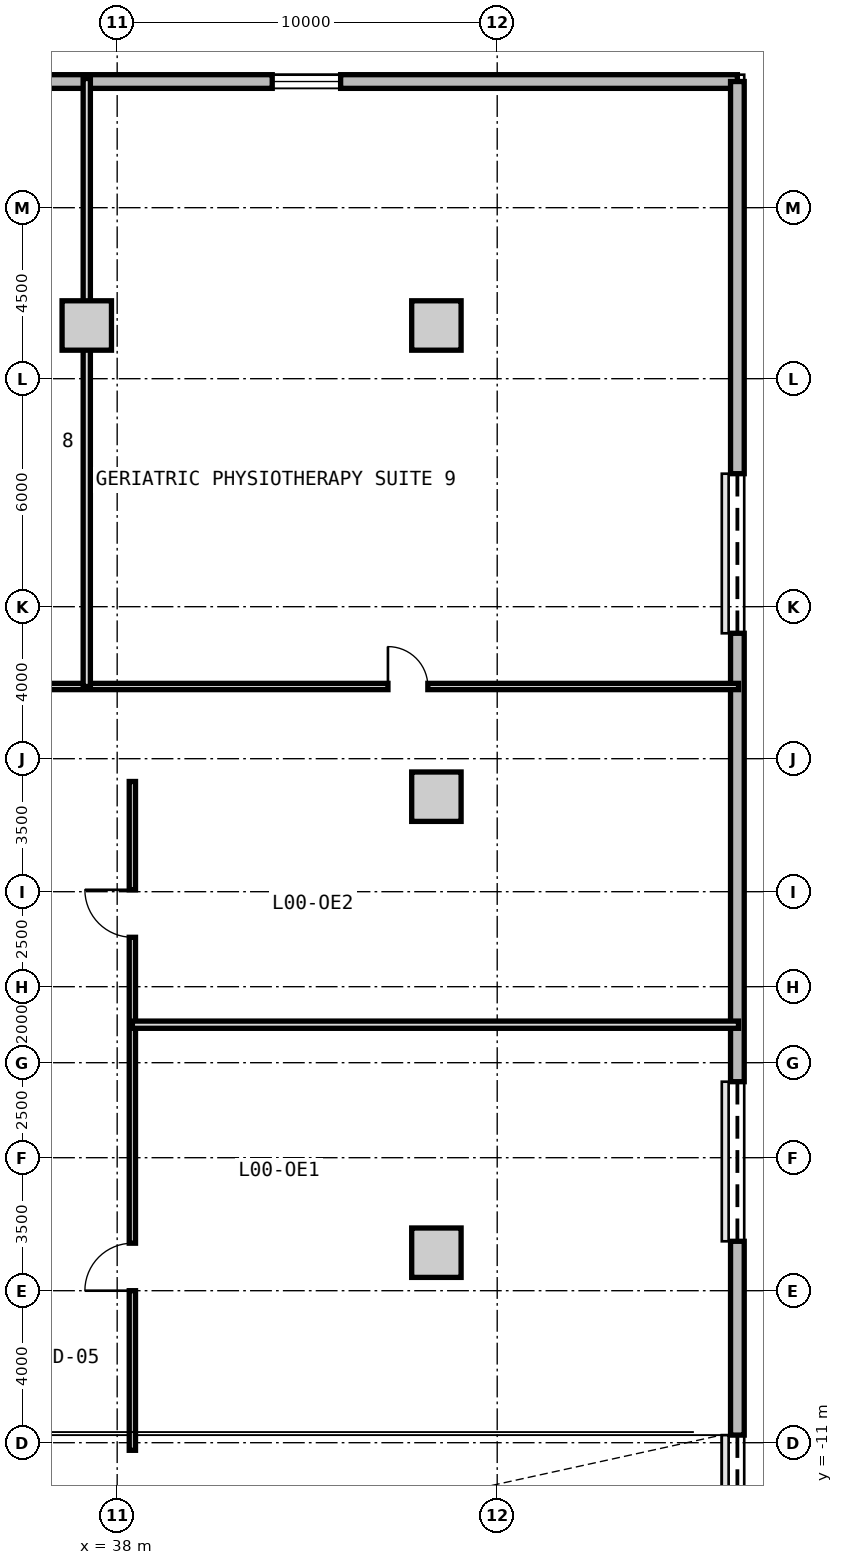
"""IFC4 building model, lengths in metres.
Left out: names, types, materials, properties, quantities, classifications, styles, units other than length and angle.
Written with IfcOpenShell. Run it as: python <this file> out.ifc"""

import sys

from ifc_helpers import new_model, si_unit, direction, frame, frame_2d, origin, origin_2d, place, context, subcontext, project, spatial, rectangle, extrude, source, transform, mapped, element, fill, save


model = new_model("IFC4")
c1 = context("Model", 3, precision=1e-05, world=origin(), true_north=direction((0.0, 1.0)))
c2 = subcontext(c1, "Body", "Model", "MODEL_VIEW")
j1 = project(units=[si_unit("LENGTHUNIT", "METRE"), si_unit("PLANEANGLEUNIT", "RADIAN")], contexts=[c1])
p1 = place(None, origin())
s1 = spatial("IfcSite", under=j1, at=p1, CompositionType="ELEMENT")
p2 = place(p1, origin())
s2 = spatial("IfcBuilding", under=s1, at=p2, CompositionType="ELEMENT")
p3 = place(p2, origin())
s3 = spatial("IfcBuildingStorey", under=s2, at=p3, CompositionType="ELEMENT", Elevation=0.0)
m1 = source(origin(), c2, "Body", "SweptSolid", [
    extrude(rectangle(XDim=1.3, YDim=1.3, at=origin_2d()), origin(), (0.0, 0.0, 1.0), 4.2),
])
for number, where, z_axis, x_axis in (
    (1, (37.2, 18.4, 0.0), (0.0, 0.0, 1.0), (1.0, 0.0, 0.0)),
    (2, (46.4, 18.4, 0.0), (0.0, 0.0, 1.0), (1.0, 0.0, 0.0)),
    (3, (46.4, -6.0, 0.0), (0.0, 0.0, 1.0), (1.0, 0.0, 0.0)),
    (4, (46.4, 6.0, 0.0), (0.0, 0.0, 1.0), (1.0, 0.0, 0.0)),
):
    element("IfcColumn", number, at=place(p3, frame(where, z_axis=z_axis, x_axis=x_axis)), inside=s3, PredefinedType="COLUMN", context=c2, shape_type="MappedRepresentation", body=[
        mapped(m1, transform((0.0, 0.0, 0.0), x_axis=(1.0, 0.0, 0.0), y_axis=(0.0, 1.0, 0.0), z_axis=(0.0, 0.0, 1.0), scale=1.0)),
    ])
m2 = source(origin(), c2, "Body", "SweptSolid", [
    extrude(rectangle(XDim=108.64, YDim=0.36, at=frame_2d((54.32, 0.0))), origin(), (0.0, 0.0, 1.0), 3.88),
])
p4 = place(p3, frame((-54.32, 24.82, 0.0), z_axis=(0.0, 0.0, 1.0), x_axis=(1.0, 0.0, 0.0)))
e5 = element("IfcWall", 5, at=p4, inside=s3, PredefinedType="SOLIDWALL", context=c2, shape_type="MappedRepresentation", body=[
    mapped(m2, transform((0.0, 0.0, 0.0), x_axis=(1.0, 0.0, 0.0), y_axis=(0.0, 1.0, 0.0), z_axis=(0.0, 0.0, 1.0), scale=1.0)),
])
p5 = place(p4, frame((30.82, 0.0, 0.0)))
e6 = element("IfcOpeningElement", 6, at=p5, cuts=e5, PredefinedType="OPENING", context=c2, shape_type="SweptSolid", body=[
    extrude(rectangle(XDim=2.0, YDim=2.3, at=frame_2d((1.0, 1.15))), frame((0.0, 0.19, 0.0), z_axis=(0.0, -1.0, 0.0), x_axis=(1.0, 0.0, 0.0)), (0.0, 0.0, 1.0), 0.38),
])
p6 = place(p4, frame((75.82, 0.0, 0.0)))
e7 = element("IfcOpeningElement", 7, at=p6, cuts=e5, PredefinedType="OPENING", context=c2, shape_type="SweptSolid", body=[
    extrude(rectangle(XDim=2.0, YDim=2.3, at=frame_2d((1.0, 1.15))), frame((0.0, 0.19, 0.0), z_axis=(0.0, -1.0, 0.0), x_axis=(1.0, 0.0, 0.0)), (0.0, 0.0, 1.0), 0.38),
])
p7 = place(p4, frame((4.0, 0.0, 0.85)))
e8 = element("IfcOpeningElement", 8, at=p7, cuts=e5, PredefinedType="OPENING", context=c2, shape_type="SweptSolid", body=[
    extrude(rectangle(XDim=2.4, YDim=2.2, at=frame_2d((1.2, 1.1))), frame((0.0, 0.19, 0.0), z_axis=(0.0, -1.0, 0.0), x_axis=(1.0, 0.0, 0.0)), (0.0, 0.0, 1.0), 0.38),
])
p8 = place(p4, frame((12.4, 0.0, 0.85)))
e9 = element("IfcOpeningElement", 9, at=p8, cuts=e5, PredefinedType="OPENING", context=c2, shape_type="SweptSolid", body=[
    extrude(rectangle(XDim=3.0, YDim=2.1, at=frame_2d((1.5, 1.05))), frame((0.0, 0.19, 0.0), z_axis=(0.0, -1.0, 0.0), x_axis=(1.0, 0.0, 0.0)), (0.0, 0.0, 1.0), 0.38),
])
p9 = place(p4, frame((20.8, 0.0, 0.9)))
e10 = element("IfcOpeningElement", 10, at=p9, cuts=e5, PredefinedType="OPENING", context=c2, shape_type="SweptSolid", body=[
    extrude(rectangle(XDim=1.8, YDim=2.0, at=frame_2d((0.9, 1.0))), frame((0.0, 0.19, 0.0), z_axis=(0.0, -1.0, 0.0), x_axis=(1.0, 0.0, 0.0)), (0.0, 0.0, 1.0), 0.38),
])
p10 = place(p4, frame((54.4, 0.0, 0.85)))
e11 = element("IfcOpeningElement", 11, at=p10, cuts=e5, PredefinedType="OPENING", context=c2, shape_type="SweptSolid", body=[
    extrude(rectangle(XDim=2.4, YDim=2.2, at=frame_2d((1.2, 1.1))), frame((0.0, 0.19, 0.0), z_axis=(0.0, -1.0, 0.0), x_axis=(1.0, 0.0, 0.0)), (0.0, 0.0, 1.0), 0.38),
])
p11 = place(p4, frame((62.8, 0.0, 0.85)))
e12 = element("IfcOpeningElement", 12, at=p11, cuts=e5, PredefinedType="OPENING", context=c2, shape_type="SweptSolid", body=[
    extrude(rectangle(XDim=3.0, YDim=2.1, at=frame_2d((1.5, 1.05))), frame((0.0, 0.19, 0.0), z_axis=(0.0, -1.0, 0.0), x_axis=(1.0, 0.0, 0.0)), (0.0, 0.0, 1.0), 0.38),
])
p12 = place(p4, frame((96.4, 0.0, 0.9)))
e13 = element("IfcOpeningElement", 13, at=p12, cuts=e5, PredefinedType="OPENING", context=c2, shape_type="SweptSolid", body=[
    extrude(rectangle(XDim=1.8, YDim=2.0, at=frame_2d((0.9, 1.0))), frame((0.0, 0.19, 0.0), z_axis=(0.0, -1.0, 0.0), x_axis=(1.0, 0.0, 0.0)), (0.0, 0.0, 1.0), 0.38),
])
m3 = source(origin(), c2, "Body", "SweptSolid", [
    extrude(rectangle(XDim=49.64, YDim=0.36, at=frame_2d((24.82, 0.0))), origin(), (0.0, 0.0, 1.0), 3.88),
])
p13 = place(p3, frame((54.32, 24.82, 0.0), z_axis=(0.0, 0.0, 1.0), x_axis=(0.0, -1.0, 0.0)))
e14 = element("IfcWall", 14, at=p13, inside=s3, PredefinedType="SOLIDWALL", context=c2, shape_type="MappedRepresentation", body=[
    mapped(m3, transform((0.0, 0.0, 0.0), x_axis=(1.0, 0.0, 0.0), y_axis=(0.0, 1.0, 0.0), z_axis=(0.0, 0.0, 1.0), scale=1.0)),
])
p14 = place(p13, frame((35.62, 0.0, 0.0)))
e15 = element("IfcOpeningElement", 15, at=p14, cuts=e14, PredefinedType="OPENING", context=c2, shape_type="SweptSolid", body=[
    extrude(rectangle(XDim=6.6, YDim=2.8, at=frame_2d((3.3, 1.4))), frame((0.0, 0.19, 0.0), z_axis=(0.0, -1.0, 0.0), x_axis=(1.0, 0.0, 0.0)), (0.0, 0.0, 1.0), 0.38),
])
p15 = place(p13, frame((10.32, 0.0, 0.0)))
e16 = element("IfcOpeningElement", 16, at=p15, cuts=e14, PredefinedType="OPENING", context=c2, shape_type="SweptSolid", body=[
    extrude(rectangle(XDim=4.2, YDim=2.7, at=frame_2d((2.1, 1.35))), frame((0.0, 0.19, 0.0), z_axis=(0.0, -1.0, 0.0), x_axis=(1.0, 0.0, 0.0)), (0.0, 0.0, 1.0), 0.38),
])
p16 = place(p13, frame((26.32, 0.0, 0.0)))
e17 = element("IfcOpeningElement", 17, at=p16, cuts=e14, PredefinedType="OPENING", context=c2, shape_type="SweptSolid", body=[
    extrude(rectangle(XDim=4.2, YDim=2.7, at=frame_2d((2.1, 1.35))), frame((0.0, 0.19, 0.0), z_axis=(0.0, -1.0, 0.0), x_axis=(1.0, 0.0, 0.0)), (0.0, 0.0, 1.0), 0.38),
])
m4 = source(origin(), c2, "Body", "SweptSolid", [
    extrude(rectangle(XDim=17.6, YDim=0.165, at=frame_2d((8.8, 0.0))), origin(), (0.0, 0.0, 1.0), 3.865),
])
p17 = place(p3, frame((38.4, -11.2, 0.0), z_axis=(0.0, 0.0, 1.0), x_axis=(0.0, 1.0, 0.0)))
e18 = element("IfcWall", 18, at=p17, inside=s3, PredefinedType="PARTITIONING", context=c2, shape_type="MappedRepresentation", body=[
    mapped(m4, transform((0.0, 0.0, 0.0), x_axis=(1.0, 0.0, 0.0), y_axis=(0.0, 1.0, 0.0), z_axis=(0.0, 0.0, 1.0), scale=1.0)),
])
p18 = place(p17, frame((4.2, 0.0, 0.0)))
e19 = element("IfcOpeningElement", 19, at=p18, cuts=e18, PredefinedType="OPENING", context=c2, shape_type="SweptSolid", body=[
    extrude(rectangle(XDim=1.25, YDim=2.2, at=frame_2d((0.625, 1.1))), frame((0.0, 0.093, 0.0), z_axis=(0.0, -1.0, 0.0), x_axis=(1.0, 0.0, 0.0)), (0.0, 0.0, 1.0), 0.185),
])
p19 = place(p17, frame((13.5, 0.0, 0.0)))
e20 = element("IfcOpeningElement", 20, at=p19, cuts=e18, PredefinedType="OPENING", context=c2, shape_type="SweptSolid", body=[
    extrude(rectangle(XDim=1.25, YDim=2.2, at=frame_2d((0.625, 1.1))), frame((0.0, 0.093, 0.0), z_axis=(0.0, -1.0, 0.0), x_axis=(1.0, 0.0, 0.0)), (0.0, 0.0, 1.0), 0.185),
])
m5 = source(origin(), c2, "Body", "SweptSolid", [
    extrude(rectangle(XDim=15.95, YDim=0.19, at=frame_2d((7.975, 0.0))), origin(), (0.0, 0.0, 1.0), 3.865),
])
p20 = place(p3, frame((38.4, 0.0, 0.0), z_axis=(0.0, 0.0, 1.0), x_axis=(1.0, 0.0, 0.0)))
e21 = element("IfcWall", 21, at=p20, inside=s3, PredefinedType="PARTITIONING", context=c2, shape_type="MappedRepresentation", body=[
    mapped(m5, transform((0.0, 0.0, 0.0), x_axis=(1.0, 0.0, 0.0), y_axis=(0.0, 1.0, 0.0), z_axis=(0.0, 0.0, 1.0), scale=1.0)),
])
m6 = source(origin(), c2, "Body", "SweptSolid", [
    extrude(rectangle(XDim=108.7, YDim=0.165, at=frame_2d((54.35, 0.0))), origin(), (0.0, 0.0, 1.0), 3.865),
])
p21 = place(p3, frame((-54.35, 8.9, 0.0), z_axis=(0.0, 0.0, 1.0), x_axis=(1.0, 0.0, 0.0)))
e22 = element("IfcWall", 22, at=p21, inside=s3, PredefinedType="PARTITIONING", context=c2, shape_type="MappedRepresentation", body=[
    mapped(m6, transform((0.0, 0.0, 0.0), x_axis=(1.0, 0.0, 0.0), y_axis=(0.0, 1.0, 0.0), z_axis=(0.0, 0.0, 1.0), scale=1.0)),
])
p22 = place(p21, frame((8.175, 0.0, 0.0)))
e23 = element("IfcOpeningElement", 23, at=p22, cuts=e22, PredefinedType="OPENING", context=c2, shape_type="SweptSolid", body=[
    extrude(rectangle(XDim=1.05, YDim=2.15, at=frame_2d((0.525, 1.075))), frame((0.0, 0.093, 0.0), z_axis=(0.0, -1.0, 0.0), x_axis=(1.0, 0.0, 0.0)), (0.0, 0.0, 1.0), 0.185),
])
p23 = place(p21, frame((21.225, 0.0, 0.0)))
e24 = element("IfcOpeningElement", 24, at=p23, cuts=e22, PredefinedType="OPENING", context=c2, shape_type="SweptSolid", body=[
    extrude(rectangle(XDim=1.05, YDim=2.15, at=frame_2d((0.525, 1.075))), frame((0.0, 0.093, 0.0), z_axis=(0.0, -1.0, 0.0), x_axis=(1.0, 0.0, 0.0)), (0.0, 0.0, 1.0), 0.185),
])
p24 = place(p21, frame((31.4, 0.0, 0.0)))
e25 = element("IfcOpeningElement", 25, at=p24, cuts=e22, PredefinedType="OPENING", context=c2, shape_type="SweptSolid", body=[
    extrude(rectangle(XDim=1.1, YDim=2.15, at=frame_2d((0.55, 1.075))), frame((0.0, 0.093, 0.0), z_axis=(0.0, -1.0, 0.0), x_axis=(1.0, 0.0, 0.0)), (0.0, 0.0, 1.0), 0.185),
])
p25 = place(p21, frame((42.175, 0.0, 0.0)))
e26 = element("IfcOpeningElement", 26, at=p25, cuts=e22, PredefinedType="OPENING", context=c2, shape_type="SweptSolid", body=[
    extrude(rectangle(XDim=1.05, YDim=2.15, at=frame_2d((0.525, 1.075))), frame((0.0, 0.093, 0.0), z_axis=(0.0, -1.0, 0.0), x_axis=(1.0, 0.0, 0.0)), (0.0, 0.0, 1.0), 0.185),
])
p26 = place(p21, frame((53.825, 0.0, 0.0)))
e27 = element("IfcOpeningElement", 27, at=p26, cuts=e22, PredefinedType="OPENING", context=c2, shape_type="SweptSolid", body=[
    extrude(rectangle(XDim=1.05, YDim=2.15, at=frame_2d((0.525, 1.075))), frame((0.0, 0.093, 0.0), z_axis=(0.0, -1.0, 0.0), x_axis=(1.0, 0.0, 0.0)), (0.0, 0.0, 1.0), 0.185),
])
p27 = place(p21, frame((65.475, 0.0, 0.0)))
e28 = element("IfcOpeningElement", 28, at=p27, cuts=e22, PredefinedType="OPENING", context=c2, shape_type="SweptSolid", body=[
    extrude(rectangle(XDim=1.05, YDim=2.15, at=frame_2d((0.525, 1.075))), frame((0.0, 0.093, 0.0), z_axis=(0.0, -1.0, 0.0), x_axis=(1.0, 0.0, 0.0)), (0.0, 0.0, 1.0), 0.185),
])
p28 = place(p21, frame((76.2, 0.0, 0.0)))
e29 = element("IfcOpeningElement", 29, at=p28, cuts=e22, PredefinedType="OPENING", context=c2, shape_type="SweptSolid", body=[
    extrude(rectangle(XDim=1.1, YDim=2.15, at=frame_2d((0.55, 1.075))), frame((0.0, 0.093, 0.0), z_axis=(0.0, -1.0, 0.0), x_axis=(1.0, 0.0, 0.0)), (0.0, 0.0, 1.0), 0.185),
])
p29 = place(p21, frame((86.425, 0.0, 0.0)))
e30 = element("IfcOpeningElement", 30, at=p29, cuts=e22, PredefinedType="OPENING", context=c2, shape_type="SweptSolid", body=[
    extrude(rectangle(XDim=1.05, YDim=2.15, at=frame_2d((0.525, 1.075))), frame((0.0, 0.093, 0.0), z_axis=(0.0, -1.0, 0.0), x_axis=(1.0, 0.0, 0.0)), (0.0, 0.0, 1.0), 0.185),
])
p30 = place(p21, frame((99.475, 0.0, 0.0)))
e31 = element("IfcOpeningElement", 31, at=p30, cuts=e22, PredefinedType="OPENING", context=c2, shape_type="SweptSolid", body=[
    extrude(rectangle(XDim=1.05, YDim=2.15, at=frame_2d((0.525, 1.075))), frame((0.0, 0.093, 0.0), z_axis=(0.0, -1.0, 0.0), x_axis=(1.0, 0.0, 0.0)), (0.0, 0.0, 1.0), 0.185),
])
m7 = source(origin(), c2, "Body", "SweptSolid", [
    extrude(rectangle(XDim=16.0, YDim=0.19, at=frame_2d((8.0, 0.0))), origin(), (0.0, 0.0, 1.0), 3.865),
])
p31 = place(p3, frame((37.2, 8.9, 0.0), z_axis=(0.0, 0.0, 1.0), x_axis=(0.0, 1.0, 0.0)))
e32 = element("IfcWall", 32, at=p31, inside=s3, PredefinedType="PARTITIONING", context=c2, shape_type="MappedRepresentation", body=[
    mapped(m7, transform((0.0, 0.0, 0.0), x_axis=(1.0, 0.0, 0.0), y_axis=(0.0, 1.0, 0.0), z_axis=(0.0, 0.0, 1.0), scale=1.0)),
])
m8 = source(origin(), c2, "Body", "SweptSolid", [
    extrude(rectangle(XDim=6.6, YDim=2.8, at=frame_2d((3.3, 1.4))), frame((0.0, 0.025, 0.0), z_axis=(0.0, -1.0, 0.0), x_axis=(1.0, 0.0, 0.0)), (0.0, 0.0, 1.0), 0.05),
])
p32 = place(p14, origin())
e33 = element("IfcDoor", 33, at=p32, inside=s3, OperationType="ROLLINGUP", PredefinedType="GATE", context=c2, shape_type="MappedRepresentation", body=[
    mapped(m8, transform((0.0, 0.0, 0.0), x_axis=(1.0, 0.0, 0.0), y_axis=(0.0, 1.0, 0.0), z_axis=(0.0, 0.0, 1.0), scale=1.0)),
])
fill(e15, e33)
m9 = source(origin(), c2, "Body", "SweptSolid", [
    extrude(rectangle(XDim=4.2, YDim=2.7, at=frame_2d((2.1, 1.35))), frame((0.0, 0.025, 0.0), z_axis=(0.0, -1.0, 0.0), x_axis=(1.0, 0.0, 0.0)), (0.0, 0.0, 1.0), 0.05),
])
p33 = place(p15, origin())
e34 = element("IfcDoor", 34, at=p33, inside=s3, OperationType="ROLLINGUP", PredefinedType="GATE", context=c2, shape_type="MappedRepresentation", body=[
    mapped(m9, transform((0.0, 0.0, 0.0), x_axis=(1.0, 0.0, 0.0), y_axis=(0.0, 1.0, 0.0), z_axis=(0.0, 0.0, 1.0), scale=1.0)),
])
fill(e16, e34)
p34 = place(p16, origin())
e35 = element("IfcDoor", 35, at=p34, inside=s3, OperationType="ROLLINGUP", PredefinedType="GATE", context=c2, shape_type="MappedRepresentation", body=[
    mapped(m9, transform((0.0, 0.0, 0.0), x_axis=(1.0, 0.0, 0.0), y_axis=(0.0, 1.0, 0.0), z_axis=(0.0, 0.0, 1.0), scale=1.0)),
])
fill(e17, e35)
m10 = source(origin(), c2, "Body", "SweptSolid", [
    extrude(rectangle(XDim=1.8, YDim=2.0, at=frame_2d((0.9, 1.0))), frame((0.0, 0.03, 0.0), z_axis=(0.0, -1.0, 0.0), x_axis=(1.0, 0.0, 0.0)), (0.0, 0.0, 1.0), 0.06),
])
p35 = place(p12, origin())
e36 = element("IfcWindow", 36, at=p35, inside=s3, PartitioningType="SINGLE_PANEL", PredefinedType="WINDOW", context=c2, shape_type="MappedRepresentation", body=[
    mapped(m10, transform((0.0, 0.0, 0.0), x_axis=(1.0, 0.0, 0.0), y_axis=(0.0, 1.0, 0.0), z_axis=(0.0, 0.0, 1.0), scale=1.0)),
])
fill(e13, e36)
m11 = source(origin(), c2, "Body", "SweptSolid", [
    extrude(rectangle(XDim=1.25, YDim=2.2, at=frame_2d((0.625, 1.1))), frame((0.0, 0.025, 0.0), z_axis=(0.0, -1.0, 0.0), x_axis=(1.0, 0.0, 0.0)), (0.0, 0.0, 1.0), 0.05),
])
p36 = place(p18, origin())
e37 = element("IfcDoor", 37, at=p36, inside=s3, OperationType="SINGLE_SWING_LEFT", PredefinedType="DOOR", context=c2, shape_type="MappedRepresentation", body=[
    mapped(m11, transform((0.0, 0.0, 0.0), x_axis=(1.0, 0.0, 0.0), y_axis=(0.0, 1.0, 0.0), z_axis=(0.0, 0.0, 1.0), scale=1.0)),
])
fill(e19, e37)
p37 = place(p19, origin())
e38 = element("IfcDoor", 38, at=p37, inside=s3, OperationType="SINGLE_SWING_RIGHT", PredefinedType="DOOR", context=c2, shape_type="MappedRepresentation", body=[
    mapped(m11, transform((0.0, 0.0, 0.0), x_axis=(1.0, 0.0, 0.0), y_axis=(0.0, 1.0, 0.0), z_axis=(0.0, 0.0, 1.0), scale=1.0)),
])
fill(e20, e38)
m12 = source(origin(), c2, "Body", "SweptSolid", [
    extrude(rectangle(XDim=1.05, YDim=2.15, at=frame_2d((0.525, 1.075))), frame((0.0, 0.025, 0.0), z_axis=(0.0, -1.0, 0.0), x_axis=(1.0, 0.0, 0.0)), (0.0, 0.0, 1.0), 0.05),
])
p38 = place(p30, origin())
e39 = element("IfcDoor", 39, at=p38, inside=s3, OperationType="SINGLE_SWING_LEFT", PredefinedType="DOOR", context=c2, shape_type="MappedRepresentation", body=[
    mapped(m12, transform((0.0, 0.0, 0.0), x_axis=(1.0, 0.0, 0.0), y_axis=(0.0, 1.0, 0.0), z_axis=(0.0, 0.0, 1.0), scale=1.0)),
])
fill(e31, e39)
save(model, sys.argv[1])
